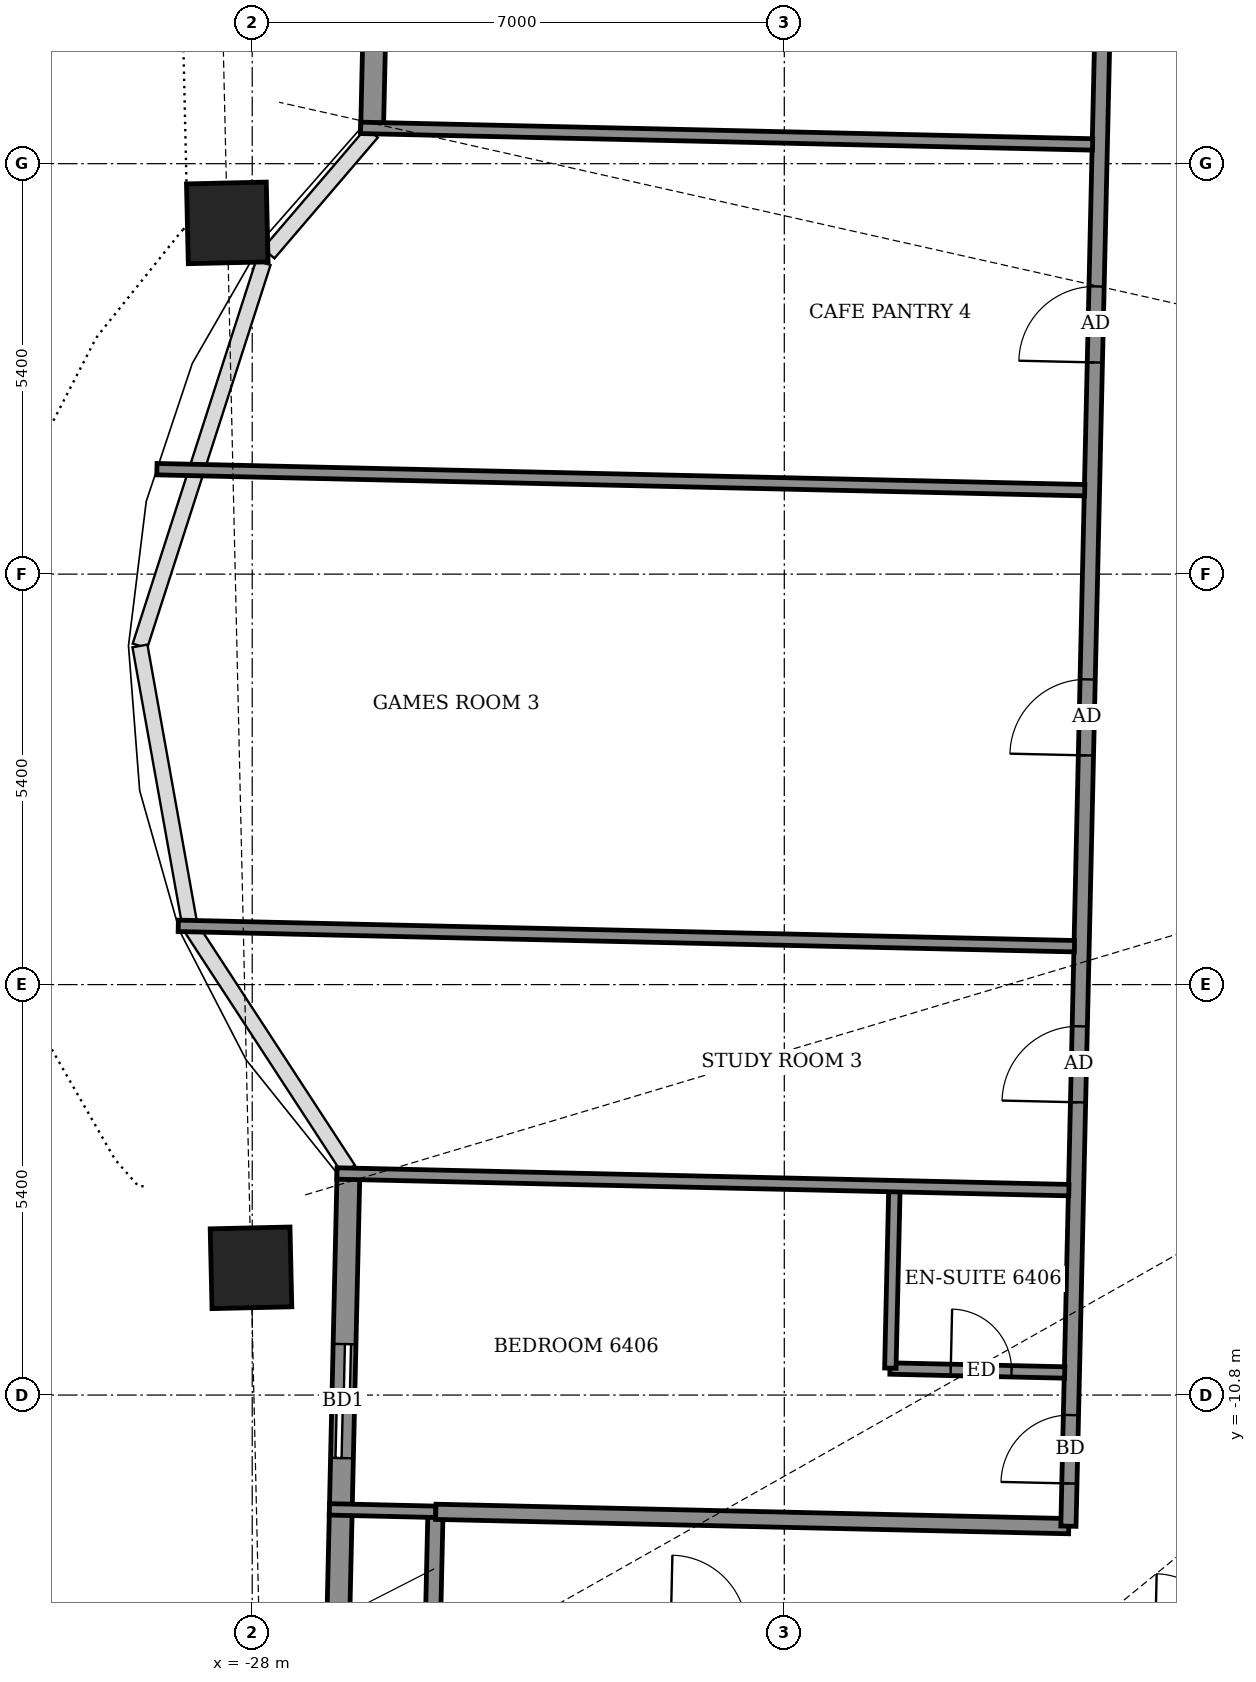
"""IFC4 building model, lengths in metres.
Left out: names, types, materials, properties, quantities, classifications, styles, units other than length and angle.
Written with IfcOpenShell. Run it as: python <this file> out.ifc"""

import sys

from ifc_helpers import new_model, si_unit, direction, frame, frame_2d, origin, origin_2d, place, context, subcontext, project, spatial, rectangle, extrude, element, fill, save


model = new_model("IFC4")
c1 = context("Model", 3, precision=1e-05, world=origin(), true_north=direction((0.0, 1.0)))
c2 = subcontext(c1, "Body", "Model", "MODEL_VIEW")
j1 = project(units=[si_unit("LENGTHUNIT", "METRE"), si_unit("PLANEANGLEUNIT", "RADIAN")], contexts=[c1])
p1 = place(None, origin())
s1 = spatial("IfcSite", under=j1, at=p1, CompositionType="ELEMENT")
p2 = place(p1, origin())
s2 = spatial("IfcBuilding", under=s1, at=p2, CompositionType="ELEMENT")
p3 = place(p2, frame((0.0, 0.0, 252.7)))
s3 = spatial("IfcBuildingStorey", under=s2, at=p3, CompositionType="ELEMENT", Elevation=252.7)
for number, where, z_axis, x_axis in (
    (1, (-28.016, -9.126, -0.55), (0.0, 0.0, 1.0), (0.023, -1.0, 0.0)),
    (2, (-28.328, 4.621, -0.55), (0.0, 0.0, 1.0), (0.023, -1.0, 0.0)),
):
    element("IfcColumn", number, at=place(p3, frame(where, z_axis=z_axis, x_axis=x_axis)), inside=s3, PredefinedType="COLUMN", context=c2, shape_type="SweptSolid", body=[
        extrude(rectangle(XDim=1.05, YDim=1.05, at=origin_2d()), origin(), (0.0, 0.0, 1.0), 4.6),
    ])
p4 = place(p3, frame((-26.113, 19.534, 0.0), z_axis=(0.0, 0.0, 1.0), x_axis=(-0.022654755793, -0.999743348085, 0.0)))
e3 = element("IfcWall", 3, at=p4, inside=s3, PredefinedType="SOLIDWALL", context=c2, shape_type="SweptSolid", body=[
    extrude(rectangle(XDim=13.729, YDim=0.3, at=frame_2d((6.865, 0.0))), origin(), (0.0, 0.0, 1.0), 2.45),
])
p5 = place(p4, frame((2.375, 0.0, 0.0)))
e4 = element("IfcOpeningElement", 4, at=p5, cuts=e3, PredefinedType="OPENING", context=c2, shape_type="SweptSolid", body=[
    extrude(rectangle(XDim=1.5, YDim=2.4, at=frame_2d((0.75, 1.2))), frame((0.0, 0.16, 0.0), z_axis=(0.0, -1.0, 0.0), x_axis=(1.0, 0.0, 0.0)), (0.0, 0.0, 1.0), 0.32),
])
p6 = place(p4, frame((8.837, 0.0, 0.9)))
e5 = element("IfcOpeningElement", 5, at=p6, cuts=e3, PredefinedType="OPENING", context=c2, shape_type="SweptSolid", body=[
    extrude(rectangle(XDim=2.4, YDim=1.5, at=frame_2d((1.2, 0.75))), frame((0.0, 0.16, 0.0), z_axis=(0.0, -1.0, 0.0), x_axis=(1.0, 0.0, 0.0)), (0.0, 0.0, 1.0), 0.32),
])
p7 = place(p3, frame((-26.733, -7.829, 0.0), z_axis=(0.0, 0.0, 1.0), x_axis=(-0.022721405353, -0.999741835545, 0.0)))
e6 = element("IfcWall", 6, at=p7, inside=s3, PredefinedType="SOLIDWALL", context=c2, shape_type="SweptSolid", body=[
    extrude(rectangle(XDim=14.13, YDim=0.3, at=frame_2d((7.065, 0.0))), origin(), (0.0, 0.0, 1.0), 2.45),
])
p8 = place(p7, frame((2.301, 0.0, 0.0)))
e7 = element("IfcOpeningElement", 7, at=p8, cuts=e6, PredefinedType="OPENING", context=c2, shape_type="SweptSolid", body=[
    extrude(rectangle(XDim=1.5, YDim=2.4, at=frame_2d((0.75, 1.2))), frame((0.0, 0.16, 0.0), z_axis=(0.0, -1.0, 0.0), x_axis=(1.0, 0.0, 0.0)), (0.0, 0.0, 1.0), 0.32),
])
p9 = place(p7, frame((9.413, 0.0, 0.9)))
e8 = element("IfcOpeningElement", 8, at=p9, cuts=e6, PredefinedType="OPENING", context=c2, shape_type="SweptSolid", body=[
    extrude(rectangle(XDim=2.4, YDim=1.5, at=frame_2d((1.2, 0.75))), frame((0.0, 0.16, 0.0), z_axis=(0.0, -1.0, 0.0), x_axis=(1.0, 0.0, 0.0)), (0.0, 0.0, 1.0), 0.32),
])
p10 = place(p3, frame((-29.57, -10.945, 0.0), z_axis=(0.0, 0.0, 1.0), x_axis=(0.022675106248, 0.999742886725, 0.0)))
e9 = element("IfcWall", 9, at=p10, inside=s3, PredefinedType="USERDEFINED", context=c2, shape_type="SweptSolid", body=[
    extrude(rectangle(XDim=2.875, YDim=0.55, at=frame_2d((1.438, 0.0))), origin(), (0.0, 0.0, 1.0), 0.8),
])
p11 = place(p3, frame((-25.623, -13.836, 0.0), z_axis=(0.0, 0.0, 1.0), x_axis=(0.022617910375, 0.999744182344, 0.0)))
e10 = element("IfcWall", 10, at=p11, inside=s3, PredefinedType="PARTITIONING", context=c2, shape_type="SweptSolid", body=[
    extrude(rectangle(XDim=1.5, YDim=0.2, at=frame_2d((0.75, 0.0))), origin(), (0.0, 0.0, 1.0), 2.45),
])
p12 = place(p3, frame((-26.985, -12.304, 0.0), z_axis=(0.0, 0.0, 1.0), x_axis=(0.999739219063, -0.022836240226, 0.0)))
e11 = element("IfcWall", 11, at=p12, inside=s3, PredefinedType="PARTITIONING", context=c2, shape_type="SweptSolid", body=[
    extrude(rectangle(XDim=1.4, YDim=0.15, at=frame_2d((0.7, 0.0))), origin(), (0.0, 0.0, 1.0), 4.05),
])
p13 = place(p3, frame((-25.585, -12.336, 0.0), z_axis=(0.0, 0.0, 1.0), x_axis=(0.999742667073, -0.022684788611, 0.0)))
e12 = element("IfcWall", 12, at=p13, inside=s3, PredefinedType="PARTITIONING", context=c2, shape_type="SweptSolid", body=[
    extrude(rectangle(XDim=8.33, YDim=0.2, at=frame_2d((4.165, 0.0))), origin(), (0.0, 0.0, 1.0), 2.45),
])
p14 = place(p3, frame((-17.262, -12.525, 0.0), z_axis=(0.0, 0.0, 1.0), x_axis=(0.022706151961, 0.999742182097, 0.0)))
e13 = element("IfcWall", 13, at=p14, inside=s3, PredefinedType="PARTITIONING", context=c2, shape_type="SweptSolid", body=[
    extrude(rectangle(XDim=25.45, YDim=0.2, at=frame_2d((12.725, 0.0))), origin(), (0.0, 0.0, 1.0), 2.45),
])
p15 = place(p14, frame((15.314, 0.0, 0.0)))
e14 = element("IfcOpeningElement", 14, at=p15, cuts=e13, PredefinedType="OPENING", context=c2, shape_type="SweptSolid", body=[
    extrude(rectangle(XDim=1.0, YDim=2.1, at=frame_2d((0.5, 1.05))), frame((0.0, 0.11, 0.0), z_axis=(0.0, -1.0, 0.0), x_axis=(1.0, 0.0, 0.0)), (0.0, 0.0, 1.0), 0.22),
])
p16 = place(p14, frame((10.143, 0.0, 0.0)))
e15 = element("IfcOpeningElement", 15, at=p16, cuts=e13, PredefinedType="OPENING", context=c2, shape_type="SweptSolid", body=[
    extrude(rectangle(XDim=1.0, YDim=2.1, at=frame_2d((0.5, 1.05))), frame((0.0, 0.11, 0.0), z_axis=(0.0, -1.0, 0.0), x_axis=(1.0, 0.0, 0.0)), (0.0, 0.0, 1.0), 0.22),
])
p17 = place(p14, frame((5.578, 0.0, 0.0)))
e16 = element("IfcOpeningElement", 16, at=p17, cuts=e13, PredefinedType="OPENING", context=c2, shape_type="SweptSolid", body=[
    extrude(rectangle(XDim=1.0, YDim=2.1, at=frame_2d((0.5, 1.05))), frame((0.0, 0.11, 0.0), z_axis=(0.0, -1.0, 0.0), x_axis=(1.0, 0.0, 0.0)), (0.0, 0.0, 1.0), 0.22),
])
p18 = place(p14, frame((0.562, 0.0, 0.0)))
e17 = element("IfcOpeningElement", 17, at=p18, cuts=e13, PredefinedType="OPENING", context=c2, shape_type="SweptSolid", body=[
    extrude(rectangle(XDim=0.9, YDim=2.1, at=frame_2d((0.45, 1.05))), frame((0.0, 0.11, 0.0), z_axis=(0.0, -1.0, 0.0), x_axis=(1.0, 0.0, 0.0)), (0.0, 0.0, 1.0), 0.22),
])
p19 = place(p3, frame((-19.61, -10.451, 0.0), z_axis=(0.0, 0.0, 1.0), x_axis=(0.999744296031, -0.022612884682, 0.0)))
e18 = element("IfcWall", 18, at=p19, inside=s3, PredefinedType="PARTITIONING", context=c2, shape_type="SweptSolid", body=[
    extrude(rectangle(XDim=2.3, YDim=0.15, at=frame_2d((1.15, 0.0))), origin(), (0.0, 0.0, 1.0), 2.45),
])
p20 = place(p19, frame((0.8, 0.0, 0.0)))
e19 = element("IfcOpeningElement", 19, at=p20, cuts=e18, PredefinedType="OPENING", context=c2, shape_type="SweptSolid", body=[
    extrude(rectangle(XDim=0.8, YDim=2.1, at=frame_2d((0.4, 1.05))), frame((0.0, 0.085, 0.0), z_axis=(0.0, -1.0, 0.0), x_axis=(1.0, 0.0, 0.0)), (0.0, 0.0, 1.0), 0.17),
])
p21 = place(p3, frame((-19.605, -10.446, 0.0), z_axis=(0.0, 0.0, 1.0), x_axis=(0.02279059109, 0.999740260747, 0.0)))
e20 = element("IfcWall", 20, at=p21, inside=s3, PredefinedType="PARTITIONING", context=c2, shape_type="SweptSolid", body=[
    extrude(rectangle(XDim=2.324, YDim=0.15, at=frame_2d((1.162, 0.0))), origin(), (0.0, 0.0, 1.0), 2.45),
])
p22 = place(p3, frame((-26.885, -7.885, 0.0), z_axis=(0.0, 0.0, 1.0), x_axis=(0.999741468995, -0.022737527832, 0.0)))
e21 = element("IfcWall", 21, at=p22, inside=s3, PredefinedType="PARTITIONING", context=c2, shape_type="SweptSolid", body=[
    extrude(rectangle(XDim=9.631, YDim=0.15, at=frame_2d((4.816, 0.0))), origin(), (0.0, 0.0, 1.0), 2.65),
])
p23 = place(p3, frame((-28.973, -4.627, 0.0), z_axis=(0.0, 0.0, 1.0), x_axis=(0.99974161105, -0.022731280962, 0.0)))
e22 = element("IfcWall", 22, at=p23, inside=s3, PredefinedType="PARTITIONING", context=c2, shape_type="SweptSolid", body=[
    extrude(rectangle(XDim=11.793, YDim=0.15, at=frame_2d((5.896, 0.0))), origin(), (0.0, 0.0, 1.0), 0.93),
])
p24 = place(p3, frame((-29.254, 1.381, 0.0), z_axis=(0.0, 0.0, 1.0), x_axis=(0.999742444231, -0.022694607376, 0.0)))
e23 = element("IfcWall", 23, at=p24, inside=s3, PredefinedType="PARTITIONING", context=c2, shape_type="SweptSolid", body=[
    extrude(rectangle(XDim=12.21, YDim=0.15, at=frame_2d((6.105, 0.0))), origin(), (0.0, 0.0, 1.0), 0.93),
])
p25 = place(p3, frame((-26.573, 5.871, 0.0), z_axis=(0.0, 0.0, 1.0), x_axis=(0.999743768709, -0.022636186244, 0.0)))
e24 = element("IfcWall", 24, at=p25, inside=s3, PredefinedType="PARTITIONING", context=c2, shape_type="SweptSolid", body=[
    extrude(rectangle(XDim=9.631, YDim=0.15, at=frame_2d((4.816, 0.0))), origin(), (0.0, 0.0, 1.0), 2.65),
])
p26 = place(p8, origin())
e25 = element("IfcDoor", 25, at=p26, inside=s3, OperationType="SLIDING_TO_LEFT", PredefinedType="DOOR", context=c2, shape_type="SweptSolid", body=[
    extrude(rectangle(XDim=1.5, YDim=2.4, at=frame_2d((0.75, 1.2))), frame((0.0, 0.025, 0.0), z_axis=(0.0, -1.0, 0.0), x_axis=(1.0, 0.0, 0.0)), (0.0, 0.0, 1.0), 0.05),
])
fill(e7, e25)
p27 = place(p15, origin())
e26 = element("IfcDoor", 26, at=p27, inside=s3, OperationType="SINGLE_SWING_RIGHT", PredefinedType="DOOR", context=c2, shape_type="SweptSolid", body=[
    extrude(rectangle(XDim=1.0, YDim=2.1, at=frame_2d((0.5, 1.05))), frame((0.0, 0.025, 0.0), z_axis=(0.0, -1.0, 0.0), x_axis=(1.0, 0.0, 0.0)), (0.0, 0.0, 1.0), 0.05),
])
fill(e14, e26)
p28 = place(p16, origin())
e27 = element("IfcDoor", 27, at=p28, inside=s3, OperationType="SINGLE_SWING_LEFT", PredefinedType="DOOR", context=c2, shape_type="SweptSolid", body=[
    extrude(rectangle(XDim=1.0, YDim=2.1, at=frame_2d((0.5, 1.05))), frame((0.0, 0.025, 0.0), z_axis=(0.0, -1.0, 0.0), x_axis=(1.0, 0.0, 0.0)), (0.0, 0.0, 1.0), 0.05),
])
fill(e15, e27)
p29 = place(p17, origin())
e28 = element("IfcDoor", 28, at=p29, inside=s3, OperationType="SINGLE_SWING_RIGHT", PredefinedType="DOOR", context=c2, shape_type="SweptSolid", body=[
    extrude(rectangle(XDim=1.0, YDim=2.1, at=frame_2d((0.5, 1.05))), frame((0.0, 0.025, 0.0), z_axis=(0.0, -1.0, 0.0), x_axis=(1.0, 0.0, 0.0)), (0.0, 0.0, 1.0), 0.05),
])
fill(e16, e28)
p30 = place(p18, origin())
e29 = element("IfcDoor", 29, at=p30, inside=s3, OperationType="SINGLE_SWING_RIGHT", PredefinedType="DOOR", context=c2, shape_type="SweptSolid", body=[
    extrude(rectangle(XDim=0.9, YDim=2.1, at=frame_2d((0.45, 1.05))), frame((0.0, 0.025, 0.0), z_axis=(0.0, -1.0, 0.0), x_axis=(1.0, 0.0, 0.0)), (0.0, 0.0, 1.0), 0.05),
])
fill(e17, e29)
p31 = place(p20, origin())
e30 = element("IfcDoor", 30, at=p31, inside=s3, OperationType="SINGLE_SWING_RIGHT", PredefinedType="DOOR", context=c2, shape_type="SweptSolid", body=[
    extrude(rectangle(XDim=0.8, YDim=2.1, at=frame_2d((0.4, 1.05))), frame((0.0, 0.025, 0.0), z_axis=(0.0, -1.0, 0.0), x_axis=(1.0, 0.0, 0.0)), (0.0, 0.0, 1.0), 0.05),
])
fill(e19, e30)
save(model, sys.argv[1])
